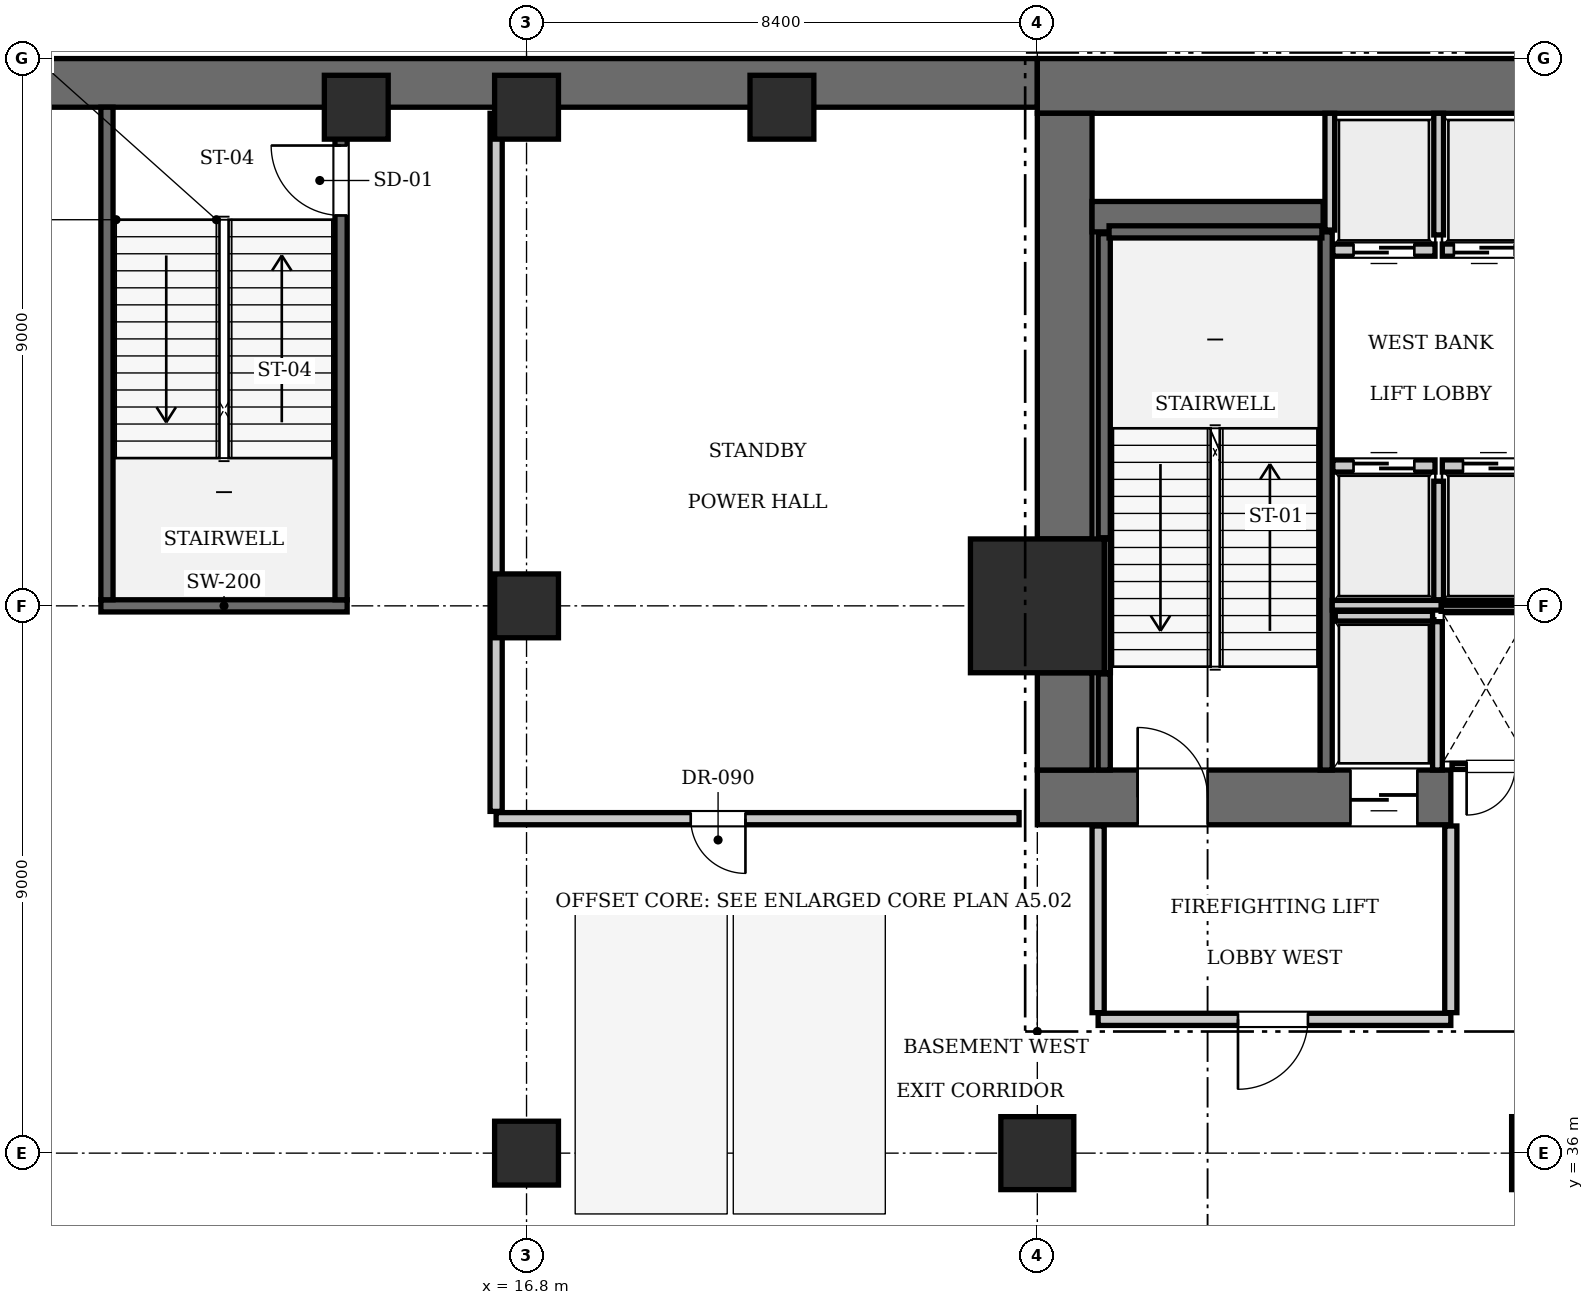
"""IFC4 building model, lengths in metres.
Left out: names, types, materials, properties, quantities, classifications, styles, units other than length and angle.
Written with IfcOpenShell. Run it as: python <this file> out.ifc"""

import sys

from ifc_helpers import new_model, si_unit, direction, frame, frame_2d, origin, origin_2d, place, context, subcontext, project, spatial, rectangle, extrude, element, fill, save


model = new_model("IFC4")
c1 = context("Model", 3, precision=1e-05, world=origin(), true_north=direction((0.0, 1.0)))
c2 = subcontext(c1, "Body", "Model", "MODEL_VIEW")
j1 = project(units=[si_unit("LENGTHUNIT", "METRE"), si_unit("PLANEANGLEUNIT", "RADIAN")], contexts=[c1])
p1 = place(None, origin())
s1 = spatial("IfcSite", under=j1, at=p1, CompositionType="ELEMENT")
p2 = place(p1, origin())
s2 = spatial("IfcBuilding", under=s1, at=p2, CompositionType="ELEMENT")
p3 = place(p2, frame((0.0, 0.0, -5.25)))
s3 = spatial("IfcBuildingStorey", under=s2, at=p3, CompositionType="ELEMENT", Elevation=-5.25)
p4 = place(p3, frame((0.0, 53.6, 0.0), z_axis=(0.0, 0.0, 1.0), x_axis=(1.0, 0.0, 0.0)))
e1 = element("IfcWall", 1, at=p4, inside=s3, PredefinedType="USERDEFINED", context=c2, shape_type="SweptSolid", body=[
    extrude(rectangle(XDim=25.2, YDim=0.8, at=frame_2d((12.6, 0.0))), origin(), (0.0, 0.0, 1.0), 5.25),
])
p5 = place(p3, frame((25.2, 45.0, 0.0), z_axis=(0.0, 0.0, 1.0), x_axis=(1.0, 0.0, 0.0)))
e2 = element("IfcColumn", 2, at=p5, inside=s3, PredefinedType="COLUMN", context=c2, shape_type="SweptSolid", body=[
    extrude(rectangle(XDim=2.2, YDim=2.2, at=origin_2d()), origin(), (0.0, 0.0, 1.0), 5.25),
])
p6 = place(p3, frame((25.2, 53.55, 0.0), z_axis=(0.0, 0.0, 1.0), x_axis=(1.0, 0.0, 0.0)))
e3 = element("IfcWall", 3, at=p6, inside=s3, PredefinedType="SHEAR", context=c2, shape_type="SweptSolid", body=[
    extrude(rectangle(XDim=25.2, YDim=0.9, at=frame_2d((12.6, 0.0))), origin(), (0.0, 0.0, 1.0), 5.25),
])
p7 = place(p3, frame((25.2, 41.85, 0.0), z_axis=(0.0, 0.0, 1.0), x_axis=(1.0, 0.0, 0.0)))
e4 = element("IfcWall", 4, at=p7, inside=s3, PredefinedType="SHEAR", context=c2, shape_type="SweptSolid", body=[
    extrude(rectangle(XDim=6.8, YDim=0.9, at=frame_2d((3.4, 0.0))), origin(), (0.0, 0.0, 1.0), 5.25),
])
p8 = place(p7, frame((1.65, 0.0, 0.0)))
e5 = element("IfcOpeningElement", 5, at=p8, cuts=e4, PredefinedType="OPENING", context=c2, shape_type="SweptSolid", body=[
    extrude(rectangle(XDim=1.15, YDim=2.15, at=frame_2d((0.575, 1.075))), frame((0.0, 0.46, 0.0), z_axis=(0.0, -1.0, 0.0), x_axis=(1.0, 0.0, 0.0)), (0.0, 0.0, 1.0), 0.92),
])
p9 = place(p7, frame((5.15, 0.0, 0.0)))
e6 = element("IfcOpeningElement", 6, at=p9, cuts=e4, PredefinedType="OPENING", context=c2, shape_type="SweptSolid", body=[
    extrude(rectangle(XDim=1.1, YDim=2.2, at=frame_2d((0.55, 1.1))), frame((0.0, 0.46, 0.0), z_axis=(0.0, -1.0, 0.0), x_axis=(1.0, 0.0, 0.0)), (0.0, 0.0, 1.0), 0.92),
])
p10 = place(p3, frame((25.65, 42.3, 0.0), z_axis=(0.0, 0.0, 1.0), x_axis=(0.0, 1.0, 0.0)))
e7 = element("IfcWall", 7, at=p10, inside=s3, PredefinedType="SHEAR", context=c2, shape_type="SweptSolid", body=[
    extrude(rectangle(XDim=1.6, YDim=0.9, at=frame_2d((0.8, 0.0))), origin(), (0.0, 0.0, 1.0), 5.25),
])
p11 = place(p3, frame((25.65, 46.1, 0.0), z_axis=(0.0, 0.0, 1.0), x_axis=(0.0, 1.0, 0.0)))
e8 = element("IfcWall", 8, at=p11, inside=s3, PredefinedType="SHEAR", context=c2, shape_type="SweptSolid", body=[
    extrude(rectangle(XDim=7.0, YDim=0.9, at=frame_2d((3.5, 0.0))), origin(), (0.0, 0.0, 1.0), 5.25),
])
p12 = place(p3, frame((26.1, 51.4, 0.0), z_axis=(0.0, 0.0, 1.0), x_axis=(1.0, 0.0, 0.0)))
e9 = element("IfcWall", 9, at=p12, inside=s3, PredefinedType="SHEAR", context=c2, shape_type="SweptSolid", body=[
    extrude(rectangle(XDim=3.8, YDim=0.5, at=frame_2d((1.9, 0.0))), origin(), (0.0, 0.0, 1.0), 5.25),
])
for number, where, z_axis, x_axis in (
    (10, (25.2, 36.0, 0.0), (0.0, 0.0, 1.0), (1.0, 0.0, 0.0)),
    (11, (33.6, 36.0, 0.0), (0.0, 0.0, 1.0), (1.0, 0.0, 0.0)),
):
    element("IfcColumn", number, at=place(p3, frame(where, z_axis=z_axis, x_axis=x_axis)), inside=s3, PredefinedType="COLUMN", context=c2, shape_type="SweptSolid", body=[
        extrude(rectangle(XDim=1.2, YDim=1.2, at=origin_2d()), origin(), (0.0, 0.0, 1.0), 5.25),
    ])
for number, where, z_axis, x_axis in (
    (12, (16.8, 36.0, 0.0), (0.0, 0.0, 1.0), (1.0, 0.0, 0.0)),
    (13, (16.8, 45.0, 0.0), (0.0, 0.0, 1.0), (1.0, 0.0, 0.0)),
    (14, (16.8, 53.2, 0.0), (0.0, 0.0, 1.0), (1.0, 0.0, 0.0)),
    (15, (14.0, 53.2, 0.0), (0.0, 0.0, 1.0), (1.0, 0.0, 0.0)),
    (16, (21.0, 53.2, 0.0), (0.0, 0.0, 1.0), (1.0, 0.0, 0.0)),
):
    element("IfcColumn", number, at=place(p3, frame(where, z_axis=z_axis, x_axis=x_axis)), inside=s3, PredefinedType="COLUMN", context=c2, shape_type="SweptSolid", body=[
        extrude(rectangle(XDim=1.05, YDim=1.05, at=origin_2d()), origin(), (0.0, 0.0, 1.0), 5.25),
    ])
p13 = place(p3, frame((29.95, 42.3, 0.0), z_axis=(0.0, 0.0, 1.0), x_axis=(0.0, 1.0, 0.0)))
e17 = element("IfcWall", 17, at=p13, inside=s3, PredefinedType="SOLIDWALL", context=c2, shape_type="SweptSolid", body=[
    extrude(rectangle(XDim=8.85, YDim=0.2, at=frame_2d((4.425, 0.0))), origin(), (0.0, 0.0, 1.0), 4.97),
])
p14 = place(p3, frame((26.3, 42.3, 0.0), z_axis=(0.0, 0.0, 1.0), x_axis=(0.0, 1.0, 0.0)))
e18 = element("IfcWall", 18, at=p14, inside=s3, PredefinedType="SOLIDWALL", context=c2, shape_type="SweptSolid", body=[
    extrude(rectangle(XDim=1.58, YDim=0.2, at=frame_2d((0.79, 0.0))), origin(), (0.0, 0.0, 1.0), 4.97),
])
p15 = place(p3, frame((26.3, 46.12, 0.0), z_axis=(0.0, 0.0, 1.0), x_axis=(0.0, 1.0, 0.0)))
e19 = element("IfcWall", 19, at=p15, inside=s3, PredefinedType="SOLIDWALL", context=c2, shape_type="SweptSolid", body=[
    extrude(rectangle(XDim=5.0, YDim=0.2, at=frame_2d((2.5, 0.0))), origin(), (0.0, 0.0, 1.0), 4.97),
])
p16 = place(p3, frame((26.38, 51.15, 0.0), z_axis=(0.0, 0.0, 1.0), x_axis=(1.0, 0.0, 0.0)))
e20 = element("IfcWall", 20, at=p16, inside=s3, PredefinedType="SOLIDWALL", context=c2, shape_type="SweptSolid", body=[
    extrude(rectangle(XDim=3.5, YDim=0.2, at=frame_2d((1.75, 0.0))), origin(), (0.0, 0.0, 1.0), 4.97),
])
p17 = place(p3, frame((26.352, 43.9, 0.0), z_axis=(0.0, 0.0, 1.0), x_axis=(0.0, 1.0, 0.0)))
e21 = element("IfcWall", 21, at=p17, inside=s3, PredefinedType="SOLIDWALL", context=c2, shape_type="SweptSolid", body=[
    extrude(rectangle(XDim=2.2, YDim=0.1, at=frame_2d((1.1, 0.0))), origin(), (0.0, 0.0, 1.0), 4.97),
])
p18 = place(p3, frame((9.8, 45.0, 0.0), z_axis=(0.0, 0.0, 1.0), x_axis=(1.0, 0.0, 0.0)))
e22 = element("IfcWall", 22, at=p18, inside=s3, PredefinedType="SOLIDWALL", context=c2, shape_type="SweptSolid", body=[
    extrude(rectangle(XDim=4.05, YDim=0.2, at=frame_2d((2.025, 0.0))), origin(), (0.0, 0.0, 1.0), 4.335),
])
p19 = place(p3, frame((9.9, 45.1, 0.0), z_axis=(0.0, 0.0, 1.0), x_axis=(0.0, 1.0, 0.0)))
e23 = element("IfcWall", 23, at=p19, inside=s3, PredefinedType="SOLIDWALL", context=c2, shape_type="SweptSolid", body=[
    extrude(rectangle(XDim=8.1, YDim=0.2, at=frame_2d((4.05, 0.0))), origin(), (0.0, 0.0, 1.0), 4.97),
])
p20 = place(p3, frame((13.75, 45.1, 0.0), z_axis=(0.0, 0.0, 1.0), x_axis=(0.0, 1.0, 0.0)))
e24 = element("IfcWall", 24, at=p20, inside=s3, PredefinedType="SOLIDWALL", context=c2, shape_type="SweptSolid", body=[
    extrude(rectangle(XDim=8.1, YDim=0.2, at=frame_2d((4.05, 0.0))), origin(), (0.0, 0.0, 1.0), 4.97),
])
p21 = place(p20, frame((6.32, 0.0, 0.0)))
e25 = element("IfcOpeningElement", 25, at=p21, cuts=e24, PredefinedType="OPENING", context=c2, shape_type="SweptSolid", body=[
    extrude(rectangle(XDim=1.15, YDim=2.15, at=frame_2d((0.575, 1.075))), frame((0.0, 0.11, 0.0), z_axis=(0.0, -1.0, 0.0), x_axis=(1.0, 0.0, 0.0)), (0.0, 0.0, 1.0), 0.22),
])
p22 = place(p3, frame((30.06, 47.3, 0.0), z_axis=(0.0, 0.0, 1.0), x_axis=(1.0, 0.0, 0.0)))
e26 = element("IfcWall", 26, at=p22, inside=s3, PredefinedType="SOLIDWALL", context=c2, shape_type="SweptSolid", body=[
    extrude(rectangle(XDim=1.68, YDim=0.2, at=frame_2d((0.84, 0.0))), origin(), (0.0, 0.0, 1.0), 4.97),
])
p23 = place(p22, frame((0.34, 0.0, 0.0)))
e27 = element("IfcOpeningElement", 27, at=p23, cuts=e26, PredefinedType="OPENING", context=c2, shape_type="SweptSolid", body=[
    extrude(rectangle(XDim=1.0, YDim=2.15, at=frame_2d((0.5, 1.075))), frame((0.0, 0.11, 0.0), z_axis=(0.0, -1.0, 0.0), x_axis=(1.0, 0.0, 0.0)), (0.0, 0.0, 1.0), 0.22),
])
p24 = place(p3, frame((31.86, 47.3, 0.0), z_axis=(0.0, 0.0, 1.0), x_axis=(1.0, 0.0, 0.0)))
e28 = element("IfcWall", 28, at=p24, inside=s3, PredefinedType="SOLIDWALL", context=c2, shape_type="SweptSolid", body=[
    extrude(rectangle(XDim=1.68, YDim=0.2, at=frame_2d((0.84, 0.0))), origin(), (0.0, 0.0, 1.0), 4.97),
])
p25 = place(p24, frame((0.34, 0.0, 0.0)))
e29 = element("IfcOpeningElement", 29, at=p25, cuts=e28, PredefinedType="OPENING", context=c2, shape_type="SweptSolid", body=[
    extrude(rectangle(XDim=1.0, YDim=2.15, at=frame_2d((0.5, 1.075))), frame((0.0, 0.11, 0.0), z_axis=(0.0, -1.0, 0.0), x_axis=(1.0, 0.0, 0.0)), (0.0, 0.0, 1.0), 0.22),
])
p26 = place(p3, frame((30.06, 50.85, 0.0), z_axis=(0.0, 0.0, 1.0), x_axis=(1.0, 0.0, 0.0)))
e30 = element("IfcWall", 30, at=p26, inside=s3, PredefinedType="SOLIDWALL", context=c2, shape_type="SweptSolid", body=[
    extrude(rectangle(XDim=1.68, YDim=0.2, at=frame_2d((0.84, 0.0))), origin(), (0.0, 0.0, 1.0), 4.97),
])
p27 = place(p26, frame((0.34, 0.0, 0.0)))
e31 = element("IfcOpeningElement", 31, at=p27, cuts=e30, PredefinedType="OPENING", context=c2, shape_type="SweptSolid", body=[
    extrude(rectangle(XDim=1.0, YDim=2.15, at=frame_2d((0.5, 1.075))), frame((0.0, 0.11, 0.0), z_axis=(0.0, -1.0, 0.0), x_axis=(1.0, 0.0, 0.0)), (0.0, 0.0, 1.0), 0.22),
])
p28 = place(p3, frame((31.86, 50.85, 0.0), z_axis=(0.0, 0.0, 1.0), x_axis=(1.0, 0.0, 0.0)))
e32 = element("IfcWall", 32, at=p28, inside=s3, PredefinedType="SOLIDWALL", context=c2, shape_type="SweptSolid", body=[
    extrude(rectangle(XDim=1.38, YDim=0.2, at=frame_2d((0.69, 0.0))), origin(), (0.0, 0.0, 1.0), 4.97),
])
p29 = place(p28, frame((0.19, 0.0, 0.0)))
e33 = element("IfcOpeningElement", 33, at=p29, cuts=e32, PredefinedType="OPENING", context=c2, shape_type="SweptSolid", body=[
    extrude(rectangle(XDim=1.0, YDim=2.15, at=frame_2d((0.5, 1.075))), frame((0.0, 0.11, 0.0), z_axis=(0.0, -1.0, 0.0), x_axis=(1.0, 0.0, 0.0)), (0.0, 0.0, 1.0), 0.22),
])
p30 = place(p3, frame((30.1, 44.83, 0.0), z_axis=(0.0, 0.0, 1.0), x_axis=(1.0, 0.0, 0.0)))
e34 = element("IfcWall", 34, at=p30, inside=s3, PredefinedType="SOLIDWALL", context=c2, shape_type="SweptSolid", body=[
    extrude(rectangle(XDim=1.6, YDim=0.16, at=frame_2d((0.8, 0.0))), origin(), (0.0, 0.0, 1.0), 4.97),
])
p31 = place(p3, frame((31.78, 42.3, 0.0), z_axis=(0.0, 0.0, 1.0), x_axis=(0.0, 1.0, 0.0)))
e35 = element("IfcWall", 35, at=p31, inside=s3, PredefinedType="SOLIDWALL", context=c2, shape_type="SweptSolid", body=[
    extrude(rectangle(XDim=2.44, YDim=0.16, at=frame_2d((1.22, 0.0))), origin(), (0.0, 0.0, 1.0), 4.97),
])
p32 = place(p3, frame((31.8, 45.1, 0.0), z_axis=(0.0, 0.0, 1.0), x_axis=(0.0, 1.0, 0.0)))
e36 = element("IfcWall", 36, at=p32, inside=s3, PredefinedType="SOLIDWALL", context=c2, shape_type="SweptSolid", body=[
    extrude(rectangle(XDim=1.95, YDim=0.16, at=frame_2d((0.975, 0.0))), origin(), (0.0, 0.0, 1.0), 4.97),
])
p33 = place(p3, frame((30.05, 45.01, 0.0), z_axis=(0.0, 0.0, 1.0), x_axis=(1.0, 0.0, 0.0)))
e37 = element("IfcWall", 37, at=p33, inside=s3, PredefinedType="SOLIDWALL", context=c2, shape_type="SweptSolid", body=[
    extrude(rectangle(XDim=3.45, YDim=0.16, at=frame_2d((1.725, 0.0))), origin(), (0.0, 0.0, 1.0), 4.97),
])
p34 = place(p3, frame((30.01, 51.18, 0.0), z_axis=(0.0, 0.0, 1.0), x_axis=(0.0, 1.0, 0.0)))
e38 = element("IfcWall", 38, at=p34, inside=s3, PredefinedType="SOLIDWALL", context=c2, shape_type="SweptSolid", body=[
    extrude(rectangle(XDim=1.92, YDim=0.16, at=frame_2d((0.96, 0.0))), origin(), (0.0, 0.0, 1.0), 4.97),
])
p35 = place(p3, frame((31.8, 51.1, 0.0), z_axis=(0.0, 0.0, 1.0), x_axis=(0.0, 1.0, 0.0)))
e39 = element("IfcWall", 39, at=p35, inside=s3, PredefinedType="SOLIDWALL", context=c2, shape_type="SweptSolid", body=[
    extrude(rectangle(XDim=2.0, YDim=0.16, at=frame_2d((1.0, 0.0))), origin(), (0.0, 0.0, 1.0), 4.97),
])
p36 = place(p3, frame((26.2, 38.2, 0.0), z_axis=(0.0, 0.0, 1.0), x_axis=(1.0, 0.0, 0.0)))
e40 = element("IfcWall", 40, at=p36, inside=s3, PredefinedType="PARTITIONING", context=c2, shape_type="SweptSolid", body=[
    extrude(rectangle(XDim=5.8, YDim=0.2, at=frame_2d((2.9, 0.0))), origin(), (0.0, 0.0, 1.0), 4.97),
])
p37 = place(p36, frame((2.3, 0.0, 0.0)))
e41 = element("IfcOpeningElement", 41, at=p37, cuts=e40, PredefinedType="OPENING", context=c2, shape_type="SweptSolid", body=[
    extrude(rectangle(XDim=1.15, YDim=2.15, at=frame_2d((0.575, 1.075))), frame((0.0, 0.11, 0.0), z_axis=(0.0, -1.0, 0.0), x_axis=(1.0, 0.0, 0.0)), (0.0, 0.0, 1.0), 0.22),
])
for number, where, z_axis, x_axis in (
    (42, (26.2, 38.31, 0.0), (0.0, 0.0, 1.0), (0.0, 1.0, 0.0)),
    (43, (32.0, 38.31, 0.0), (0.0, 0.0, 1.0), (0.0, 1.0, 0.0)),
):
    element("IfcWall", number, at=place(p3, frame(where, z_axis=z_axis, x_axis=x_axis)), inside=s3, PredefinedType="PARTITIONING", context=c2, shape_type="SweptSolid", body=[
        extrude(rectangle(XDim=3.07, YDim=0.2, at=frame_2d((1.535, 0.0))), origin(), (0.0, 0.0, 1.0), 4.97),
    ])
p38 = place(p3, frame((32.02, 42.36, 0.0), z_axis=(0.0, 0.0, 1.0), x_axis=(1.0, 0.0, 0.0)))
e44 = element("IfcWall", 44, at=p38, inside=s3, PredefinedType="PARTITIONING", context=c2, shape_type="SweptSolid", body=[
    extrude(rectangle(XDim=1.32, YDim=0.1, at=frame_2d((0.66, 0.0))), origin(), (0.0, 0.0, 1.0), 4.97),
])
p39 = place(p38, frame((0.24, 0.0, 0.0)))
e45 = element("IfcOpeningElement", 45, at=p39, cuts=e44, PredefinedType="OPENING", context=c2, shape_type="SweptSolid", body=[
    extrude(rectangle(XDim=0.8, YDim=2.05, at=frame_2d((0.4, 1.025))), frame((0.0, 0.06, 0.0), z_axis=(0.0, -1.0, 0.0), x_axis=(1.0, 0.0, 0.0)), (0.0, 0.0, 1.0), 0.12),
])
p40 = place(p3, frame((31.84, 44.96, 0.0), z_axis=(0.0, 0.0, 1.0), x_axis=(1.0, 0.0, 0.0)))
e46 = element("IfcWall", 46, at=p40, inside=s3, PredefinedType="PARTITIONING", context=c2, shape_type="SweptSolid", body=[
    extrude(rectangle(XDim=1.48, YDim=0.1, at=frame_2d((0.74, 0.0))), origin(), (0.0, 0.0, 1.0), 4.97),
])
p41 = place(p3, frame((16.3, 41.5, 0.0), z_axis=(0.0, 0.0, 1.0), x_axis=(1.0, 0.0, 0.0)))
e47 = element("IfcWall", 47, at=p41, inside=s3, PredefinedType="PARTITIONING", context=c2, shape_type="SweptSolid", body=[
    extrude(rectangle(XDim=8.6, YDim=0.2, at=frame_2d((4.3, 0.0))), origin(), (0.0, 0.0, 1.0), 4.97),
])
p42 = place(p41, frame((3.2, 0.0, 0.0)))
e48 = element("IfcOpeningElement", 48, at=p42, cuts=e47, PredefinedType="OPENING", context=c2, shape_type="SweptSolid", body=[
    extrude(rectangle(XDim=0.9, YDim=2.1, at=frame_2d((0.45, 1.05))), frame((0.0, 0.11, 0.0), z_axis=(0.0, -1.0, 0.0), x_axis=(1.0, 0.0, 0.0)), (0.0, 0.0, 1.0), 0.22),
])
p43 = place(p3, frame((16.3, 41.62, 0.0), z_axis=(0.0, 0.0, 1.0), x_axis=(0.0, 1.0, 0.0)))
e49 = element("IfcWall", 49, at=p43, inside=s3, PredefinedType="PARTITIONING", context=c2, shape_type="SweptSolid", body=[
    extrude(rectangle(XDim=11.48, YDim=0.2, at=frame_2d((5.74, 0.0))), origin(), (0.0, 0.0, 1.0), 4.97),
])
p44 = place(p8, origin())
e50 = element("IfcDoor", 50, at=p44, inside=s3, OperationType="SINGLE_SWING_LEFT", PredefinedType="DOOR", context=c2, shape_type="SweptSolid", body=[
    extrude(rectangle(XDim=1.15, YDim=2.15, at=frame_2d((0.575, 1.075))), frame((0.0, 0.025, 0.0), z_axis=(0.0, -1.0, 0.0), x_axis=(1.0, 0.0, 0.0)), (0.0, 0.0, 1.0), 0.05),
])
fill(e5, e50)
p45 = place(p21, origin())
e51 = element("IfcDoor", 51, at=p45, inside=s3, OperationType="SINGLE_SWING_RIGHT", PredefinedType="DOOR", context=c2, shape_type="SweptSolid", body=[
    extrude(rectangle(XDim=1.15, YDim=2.15, at=frame_2d((0.575, 1.075))), frame((0.0, 0.025, 0.0), z_axis=(0.0, -1.0, 0.0), x_axis=(1.0, 0.0, 0.0)), (0.0, 0.0, 1.0), 0.05),
])
fill(e25, e51)
p46 = place(p23, origin())
e52 = element("IfcDoor", 52, at=p46, inside=s3, OperationType="SLIDING_TO_LEFT", PredefinedType="DOOR", context=c2, shape_type="SweptSolid", body=[
    extrude(rectangle(XDim=1.0, YDim=2.15, at=frame_2d((0.5, 1.075))), frame((0.0, 0.025, 0.0), z_axis=(0.0, -1.0, 0.0), x_axis=(1.0, 0.0, 0.0)), (0.0, 0.0, 1.0), 0.05),
])
fill(e27, e52)
p47 = place(p25, origin())
e53 = element("IfcDoor", 53, at=p47, inside=s3, OperationType="SLIDING_TO_LEFT", PredefinedType="DOOR", context=c2, shape_type="SweptSolid", body=[
    extrude(rectangle(XDim=1.0, YDim=2.15, at=frame_2d((0.5, 1.075))), frame((0.0, 0.025, 0.0), z_axis=(0.0, -1.0, 0.0), x_axis=(1.0, 0.0, 0.0)), (0.0, 0.0, 1.0), 0.05),
])
fill(e29, e53)
p48 = place(p27, frame((1.0, 0.0, 0.0), z_axis=(0.0, 0.0, 1.0), x_axis=(-1.0, 0.0, 0.0)))
e54 = element("IfcDoor", 54, at=p48, inside=s3, OperationType="SLIDING_TO_LEFT", PredefinedType="DOOR", context=c2, shape_type="SweptSolid", body=[
    extrude(rectangle(XDim=1.0, YDim=2.15, at=frame_2d((0.5, 1.075))), frame((0.0, 0.025, 0.0), z_axis=(0.0, -1.0, 0.0), x_axis=(1.0, 0.0, 0.0)), (0.0, 0.0, 1.0), 0.05),
])
fill(e31, e54)
p49 = place(p29, frame((1.0, 0.0, 0.0), z_axis=(0.0, 0.0, 1.0), x_axis=(-1.0, 0.0, 0.0)))
e55 = element("IfcDoor", 55, at=p49, inside=s3, OperationType="SLIDING_TO_LEFT", PredefinedType="DOOR", context=c2, shape_type="SweptSolid", body=[
    extrude(rectangle(XDim=1.0, YDim=2.15, at=frame_2d((0.5, 1.075))), frame((0.0, 0.025, 0.0), z_axis=(0.0, -1.0, 0.0), x_axis=(1.0, 0.0, 0.0)), (0.0, 0.0, 1.0), 0.05),
])
fill(e33, e55)
p50 = place(p9, frame((1.1, 0.0, 0.0), z_axis=(0.0, 0.0, 1.0), x_axis=(-1.0, 0.0, 0.0)))
e56 = element("IfcDoor", 56, at=p50, inside=s3, OperationType="SLIDING_TO_LEFT", PredefinedType="DOOR", context=c2, shape_type="SweptSolid", body=[
    extrude(rectangle(XDim=1.1, YDim=2.2, at=frame_2d((0.55, 1.1))), frame((0.0, 0.025, 0.0), z_axis=(0.0, -1.0, 0.0), x_axis=(1.0, 0.0, 0.0)), (0.0, 0.0, 1.0), 0.05),
])
fill(e6, e56)
p51 = place(p37, frame((1.15, 0.0, 0.0), z_axis=(0.0, 0.0, 1.0), x_axis=(-1.0, 0.0, 0.0)))
e57 = element("IfcDoor", 57, at=p51, inside=s3, OperationType="SINGLE_SWING_RIGHT", PredefinedType="DOOR", context=c2, shape_type="SweptSolid", body=[
    extrude(rectangle(XDim=1.15, YDim=2.15, at=frame_2d((0.575, 1.075))), frame((0.0, 0.025, 0.0), z_axis=(0.0, -1.0, 0.0), x_axis=(1.0, 0.0, 0.0)), (0.0, 0.0, 1.0), 0.05),
])
fill(e41, e57)
p52 = place(p39, frame((0.8, 0.0, 0.0), z_axis=(0.0, 0.0, 1.0), x_axis=(-1.0, 0.0, 0.0)))
e58 = element("IfcDoor", 58, at=p52, inside=s3, OperationType="SINGLE_SWING_RIGHT", PredefinedType="DOOR", context=c2, shape_type="SweptSolid", body=[
    extrude(rectangle(XDim=0.8, YDim=2.05, at=frame_2d((0.4, 1.025))), frame((0.0, 0.025, 0.0), z_axis=(0.0, -1.0, 0.0), x_axis=(1.0, 0.0, 0.0)), (0.0, 0.0, 1.0), 0.05),
])
fill(e45, e58)
p53 = place(p42, frame((0.9, 0.0, 0.0), z_axis=(0.0, 0.0, 1.0), x_axis=(-1.0, 0.0, 0.0)))
e59 = element("IfcDoor", 59, at=p53, inside=s3, OperationType="SINGLE_SWING_LEFT", PredefinedType="DOOR", context=c2, shape_type="SweptSolid", body=[
    extrude(rectangle(XDim=0.9, YDim=2.1, at=frame_2d((0.45, 1.05))), frame((0.0, 0.025, 0.0), z_axis=(0.0, -1.0, 0.0), x_axis=(1.0, 0.0, 0.0)), (0.0, 0.0, 1.0), 0.05),
])
fill(e48, e59)
save(model, sys.argv[1])
